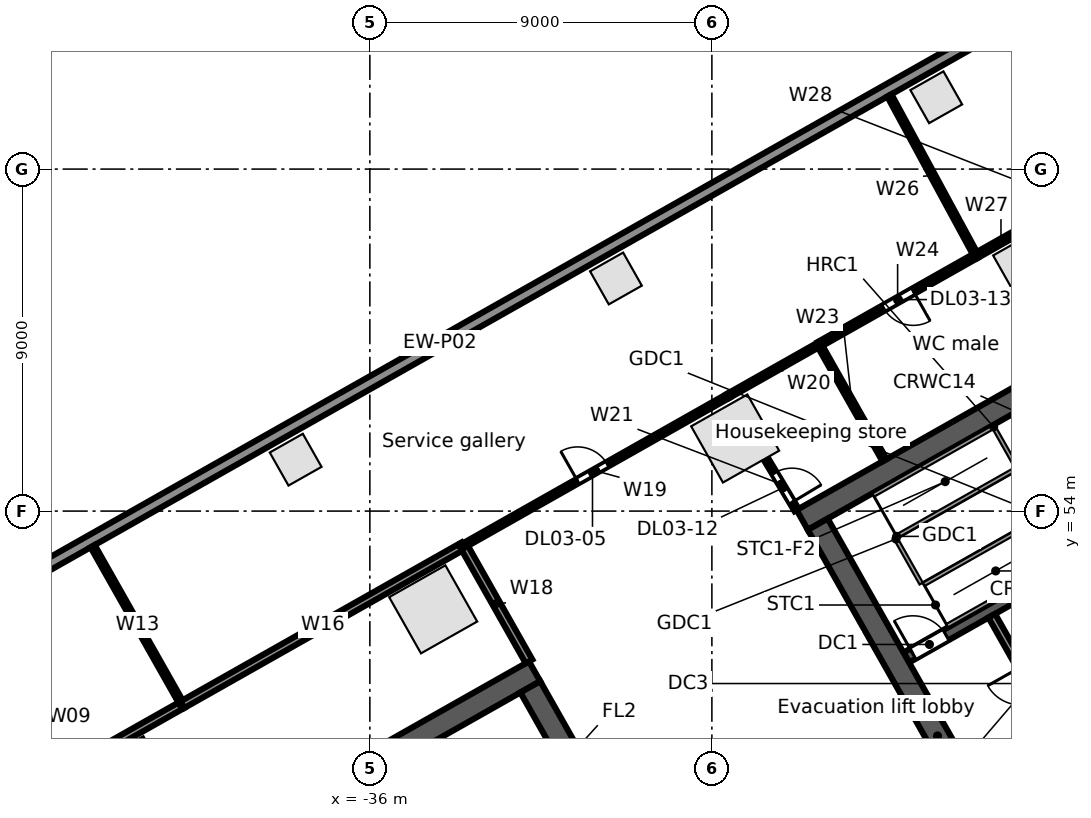
"""IFC4 building model, lengths in metres.
Left out: names, types, materials, properties, quantities, classifications, styles, units other than length and angle.
Written with IfcOpenShell. Run it as: python <this file> out.ifc"""

import sys

from ifc_helpers import new_model, si_unit, direction, frame, frame_2d, origin, origin_2d, place, context, subcontext, project, spatial, rectangle, extrude, element, fill, save


model = new_model("IFC4")
c1 = context("Model", 3, precision=1e-05, world=origin(), true_north=direction((0.0, 1.0)))
c2 = subcontext(c1, "Body", "Model", "MODEL_VIEW")
j1 = project(units=[si_unit("LENGTHUNIT", "METRE"), si_unit("PLANEANGLEUNIT", "RADIAN")], contexts=[c1])
p1 = place(None, origin())
s1 = spatial("IfcSite", under=j1, at=p1, CompositionType="ELEMENT")
p2 = place(p1, origin())
s2 = spatial("IfcBuilding", under=s1, at=p2, CompositionType="ELEMENT")
p3 = place(p2, frame((0.0, 0.0, 21.5)))
s3 = spatial("IfcBuildingStorey", under=s2, at=p3, CompositionType="ELEMENT", Elevation=21.5)
for number, where, z_axis, x_axis in (
    (1, (-18.441, 60.406, 0.0), (0.0, 0.0, 1.0), (-0.87, -0.492, 0.0)),
    (2, (-26.388, 55.91, 0.0), (0.0, 0.0, 1.0), (-0.87, -0.492, 0.0)),
    (3, (-34.334, 51.414, 0.0), (0.0, 0.0, 1.0), (-0.87, -0.492, 0.0)),
    (4, (-42.28, 46.919, 0.0), (0.0, 0.0, 1.0), (-0.87, -0.492, 0.0)),
):
    element("IfcColumn", number, at=place(p3, frame(where, z_axis=z_axis, x_axis=x_axis)), inside=s3, PredefinedType="COLUMN", context=c2, shape_type="SweptSolid", body=[
        extrude(rectangle(XDim=1.7, YDim=1.7, at=origin_2d()), origin(), (0.0, 0.0, 1.0), 5.0),
    ])
for number, where, z_axis, x_axis in (
    (5, (-21.096, 64.89, 0.0), (0.0, 0.0, 1.0), (-0.87, -0.492, 0.0)),
    (6, (-29.524, 60.122, 0.0), (0.0, 0.0, 1.0), (-0.87, -0.492, 0.0)),
    (7, (-37.953, 55.353, 0.0), (0.0, 0.0, 1.0), (-0.87, -0.492, 0.0)),
):
    element("IfcColumn", number, at=place(p3, frame(where, z_axis=z_axis, x_axis=x_axis)), inside=s3, PredefinedType="COLUMN", context=c2, shape_type="SweptSolid", body=[
        extrude(rectangle(XDim=1.0, YDim=1.0, at=origin_2d()), origin(), (0.0, 0.0, 1.0), 4.68),
    ])
p4 = place(p3, frame((-63.707, 41.701, 0.0), z_axis=(0.0, 0.0, 1.0), x_axis=(0.870355510268, 0.492423888277, 0.0)))
e8 = element("IfcWall", 8, at=p4, inside=s3, PredefinedType="STANDARD", context=c2, shape_type="SweptSolid", body=[
    extrude(rectangle(XDim=67.903, YDim=0.3, at=frame_2d((33.952, 0.0))), origin(), (0.0, 0.0, 1.0), 4.68),
])
p5 = place(p3, frame((-46.461, 41.412, 0.0), z_axis=(0.0, 0.0, 1.0), x_axis=(0.870350116061, 0.492433422375, 0.0)))
e9 = element("IfcWall", 9, at=p5, inside=s3, PredefinedType="SOLIDWALL", context=c2, shape_type="SweptSolid", body=[
    extrude(rectangle(XDim=17.0, YDim=0.6, at=frame_2d((8.5, 0.0))), origin(), (0.0, 0.0, 1.0), 4.68),
])
p6 = place(p3, frame((-31.778, 49.374, 0.0), z_axis=(0.0, 0.0, 1.0), x_axis=(0.492433046652, -0.870350328641, 0.0)))
e10 = element("IfcWall", 10, at=p6, inside=s3, PredefinedType="SOLIDWALL", context=c2, shape_type="SweptSolid", body=[
    extrude(rectangle(XDim=12.8, YDim=0.6, at=frame_2d((6.4, 0.0))), origin(), (0.0, 0.0, 1.0), 4.68),
])
p7 = place(p3, frame((-19.718, 46.316, 0.0), z_axis=(0.0, 0.0, 1.0), x_axis=(0.870353963862, 0.492426621528, 0.0)))
e11 = element("IfcWall", 11, at=p7, inside=s3, PredefinedType="SOLIDWALL", context=c2, shape_type="SweptSolid", body=[
    extrude(rectangle(XDim=4.9, YDim=0.3, at=frame_2d((2.45, 0.0))), origin(), (0.0, 0.0, 1.0), 4.68),
])
p8 = place(p7, frame((0.55, 0.0, 0.0)))
e12 = element("IfcOpeningElement", 12, at=p8, cuts=e11, PredefinedType="OPENING", context=c2, shape_type="SweptSolid", body=[
    extrude(rectangle(XDim=1.1, YDim=2.1, at=frame_2d((0.55, 1.05))), frame((0.0, 0.16, 0.0), z_axis=(0.0, -1.0, 0.0), x_axis=(1.0, 0.0, 0.0)), (0.0, 0.0, 1.0), 0.32),
])
p9 = place(p7, frame((2.85, 0.0, 0.0)))
e13 = element("IfcOpeningElement", 13, at=p9, cuts=e11, PredefinedType="OPENING", context=c2, shape_type="SweptSolid", body=[
    extrude(rectangle(XDim=0.9, YDim=2.1, at=frame_2d((0.45, 1.05))), frame((0.0, 0.16, 0.0), z_axis=(0.0, -1.0, 0.0), x_axis=(1.0, 0.0, 0.0)), (0.0, 0.0, 1.0), 0.32),
])
p10 = place(p3, frame((-21.885, 50.146, 0.0), z_axis=(0.0, 0.0, 1.0), x_axis=(0.870359411463, 0.492416992881, 0.0)))
e14 = element("IfcWall", 14, at=p10, inside=s3, PredefinedType="SOLIDWALL", context=c2, shape_type="SweptSolid", body=[
    extrude(rectangle(XDim=7.2, YDim=0.3, at=frame_2d((3.6, 0.0))), origin(), (0.0, 0.0, 1.0), 4.68),
])
p11 = place(p10, frame((0.2, 0.0, 0.0)))
e15 = element("IfcOpeningElement", 15, at=p11, cuts=e14, PredefinedType="OPENING", context=c2, shape_type="SweptSolid", body=[
    extrude(rectangle(XDim=1.0, YDim=2.1, at=frame_2d((0.5, 1.05))), frame((0.0, 0.16, 0.0), z_axis=(0.0, -1.0, 0.0), x_axis=(1.0, 0.0, 0.0)), (0.0, 0.0, 1.0), 0.32),
])
p12 = place(p3, frame((-24.623, 53.767, 0.0), z_axis=(0.0, 0.0, 1.0), x_axis=(0.870356627484, 0.492421913601, 0.0)))
e16 = element("IfcWall", 16, at=p12, inside=s3, PredefinedType="SOLIDWALL", context=c2, shape_type="SweptSolid", body=[
    extrude(rectangle(XDim=15.0, YDim=0.6, at=frame_2d((7.5, 0.0))), origin(), (0.0, 0.0, 1.0), 4.68),
])
p13 = place(p3, frame((-24.214, 53.654, 0.0), z_axis=(0.0, 0.0, 1.0), x_axis=(0.492441221355, -0.870345703448, 0.0)))
e17 = element("IfcWall", 17, at=p13, inside=s3, PredefinedType="SOLIDWALL", context=c2, shape_type="SweptSolid", body=[
    extrude(rectangle(XDim=12.8, YDim=0.6, at=frame_2d((6.4, 0.0))), origin(), (0.0, 0.0, 1.0), 4.68),
])
p14 = place(p3, frame((-19.635, 51.246, 0.0), z_axis=(0.0, 0.0, 1.0), x_axis=(0.492408451753, -0.87036424366, 0.0)))
e18 = element("IfcWall", 18, at=p14, inside=s3, PredefinedType="PARTITIONING", context=c2, shape_type="SweptSolid", body=[
    extrude(rectangle(XDim=4.1, YDim=0.2, at=frame_2d((2.05, 0.0))), origin(), (0.0, 0.0, 1.0), 4.68),
])
p15 = place(p14, frame((1.55, 0.0, 0.0)))
e19 = element("IfcOpeningElement", 19, at=p15, cuts=e18, PredefinedType="OPENING", context=c2, shape_type="SweptSolid", body=[
    extrude(rectangle(XDim=1.0, YDim=2.1, at=frame_2d((0.5, 1.05))), frame((0.0, 0.11, 0.0), z_axis=(0.0, -1.0, 0.0), x_axis=(1.0, 0.0, 0.0)), (0.0, 0.0, 1.0), 0.22),
])
p16 = place(p3, frame((-48.332, 44.719, 0.0), z_axis=(0.0, 0.0, 1.0), x_axis=(0.870331650579, 0.492466057713, 0.0)))
e20 = element("IfcWall", 20, at=p16, inside=s3, PredefinedType="PARTITIONING", context=c2, shape_type="SweptSolid", body=[
    extrude(rectangle(XDim=8.5, YDim=0.2, at=frame_2d((4.25, 0.0))), origin(), (0.0, 0.0, 1.0), 4.054),
])
p17 = place(p16, frame((3.45, 0.0, 0.0)))
e21 = element("IfcOpeningElement", 21, at=p17, cuts=e20, PredefinedType="OPENING", context=c2, shape_type="SweptSolid", body=[
    extrude(rectangle(XDim=1.8, YDim=2.1, at=frame_2d((0.9, 1.05))), frame((0.0, 0.11, 0.0), z_axis=(0.0, -1.0, 0.0), x_axis=(1.0, 0.0, 0.0)), (0.0, 0.0, 1.0), 0.22),
])
p18 = place(p3, frame((-43.295, 53.077, 0.0), z_axis=(0.0, 0.0, 1.0), x_axis=(0.492503605136, -0.87031040378, 0.0)))
e22 = element("IfcWall", 22, at=p18, inside=s3, PredefinedType="PARTITIONING", context=c2, shape_type="SweptSolid", body=[
    extrude(rectangle(XDim=4.793, YDim=0.125, at=frame_2d((2.397, 0.0))), origin(), (0.0, 0.0, 1.0), 3.96),
])
p19 = place(p3, frame((-40.934, 48.905, 0.0), z_axis=(0.0, 0.0, 1.0), x_axis=(0.870387854278, 0.492366716102, 0.0)))
e23 = element("IfcWall", 23, at=p19, inside=s3, PredefinedType="PARTITIONING", context=c2, shape_type="SweptSolid", body=[
    extrude(rectangle(XDim=8.5, YDim=0.2, at=frame_2d((4.25, 0.0))), origin(), (0.0, 0.0, 1.0), 4.054),
])
p20 = place(p3, frame((-33.536, 53.09, 0.0), z_axis=(0.0, 0.0, 1.0), x_axis=(0.492521469645, -0.870300294116, 0.0)))
e24 = element("IfcWall", 24, at=p20, inside=s3, PredefinedType="PARTITIONING", context=c2, shape_type="SweptSolid", body=[
    extrude(rectangle(XDim=3.5, YDim=0.2, at=frame_2d((1.75, 0.0))), origin(), (0.0, 0.0, 1.0), 3.96),
])
p21 = place(p3, frame((-33.536, 53.09, 0.0), z_axis=(0.0, 0.0, 1.0), x_axis=(0.870327439455, 0.492473499928, 0.0)))
e25 = element("IfcWall", 25, at=p21, inside=s3, PredefinedType="PARTITIONING", context=c2, shape_type="SweptSolid", body=[
    extrude(rectangle(XDim=8.0, YDim=0.125, at=frame_2d((4.0, 0.0))), origin(), (0.0, 0.0, 1.0), 3.742),
])
p22 = place(p21, frame((3.45, 0.0, 0.0)))
e26 = element("IfcOpeningElement", 26, at=p22, cuts=e25, PredefinedType="OPENING", context=c2, shape_type="SweptSolid", body=[
    extrude(rectangle(XDim=0.9, YDim=2.1, at=frame_2d((0.45, 1.05))), frame((0.0, 0.073, 0.0), z_axis=(0.0, -1.0, 0.0), x_axis=(1.0, 0.0, 0.0)), (0.0, 0.0, 1.0), 0.145),
])
p23 = place(p3, frame((-26.573, 57.03, 0.0), z_axis=(0.0, 0.0, 1.0), x_axis=(0.870344460795, 0.492443417626, 0.0)))
e27 = element("IfcWall", 27, at=p23, inside=s3, PredefinedType="PARTITIONING", context=c2, shape_type="SweptSolid", body=[
    extrude(rectangle(XDim=2.75, YDim=0.125, at=frame_2d((1.375, 0.0))), origin(), (0.0, 0.0, 1.0), 4.68),
])
p24 = place(p3, frame((-25.587, 55.387, 0.0), z_axis=(0.0, 0.0, 1.0), x_axis=(0.514767546849, -0.857329792268, 0.0)))
e28 = element("IfcWall", 28, at=p24, inside=s3, PredefinedType="PARTITIONING", context=c2, shape_type="SweptSolid", body=[
    extrude(rectangle(XDim=1.585, YDim=0.125, at=frame_2d((0.792, 0.0))), origin(), (0.0, 0.0, 1.0), 4.68),
])
p25 = place(p24, frame((0.45, 0.0, 0.0)))
e29 = element("IfcOpeningElement", 29, at=p25, cuts=e28, PredefinedType="OPENING", context=c2, shape_type="SweptSolid", body=[
    extrude(rectangle(XDim=0.9, YDim=2.1, at=frame_2d((0.45, 1.05))), frame((0.0, 0.073, 0.0), z_axis=(0.0, -1.0, 0.0), x_axis=(1.0, 0.0, 0.0)), (0.0, 0.0, 1.0), 0.145),
])
p26 = place(p3, frame((-24.18, 58.384, 0.0), z_axis=(0.0, 0.0, 1.0), x_axis=(0.492521469645, -0.870300294116, 0.0)))
e30 = element("IfcWall", 30, at=p26, inside=s3, PredefinedType="PARTITIONING", context=c2, shape_type="SweptSolid", body=[
    extrude(rectangle(XDim=3.5, YDim=0.125, at=frame_2d((1.75, 0.0))), origin(), (0.0, 0.0, 1.0), 3.96),
])
p27 = place(p3, frame((-24.18, 58.384, 0.0), z_axis=(0.0, 0.0, 1.0), x_axis=(0.870360772617, 0.492414587, 0.0)))
e31 = element("IfcWall", 31, at=p27, inside=s3, PredefinedType="PARTITIONING", context=c2, shape_type="SweptSolid", body=[
    extrude(rectangle(XDim=4.75, YDim=0.15, at=frame_2d((2.375, 0.0))), origin(), (0.0, 0.0, 1.0), 4.68),
])
p28 = place(p27, frame((1.95, 0.0, 0.0)))
e32 = element("IfcOpeningElement", 32, at=p28, cuts=e31, PredefinedType="OPENING", context=c2, shape_type="SweptSolid", body=[
    extrude(rectangle(XDim=0.9, YDim=2.1, at=frame_2d((0.45, 1.05))), frame((0.0, 0.085, 0.0), z_axis=(0.0, -1.0, 0.0), x_axis=(1.0, 0.0, 0.0)), (0.0, 0.0, 1.0), 0.17),
])
p29 = place(p3, frame((-22.33, 64.939, 0.0), z_axis=(0.0, 0.0, 1.0), x_axis=(0.476360236723, -0.879250206067, 0.0)))
e33 = element("IfcWall", 33, at=p29, inside=s3, PredefinedType="PARTITIONING", context=c2, shape_type="SweptSolid", body=[
    extrude(rectangle(XDim=4.795, YDim=0.125, at=frame_2d((2.397, 0.0))), origin(), (0.0, 0.0, 1.0), 3.96),
])
p30 = place(p3, frame((-20.046, 60.723, 0.0), z_axis=(0.0, 0.0, 1.0), x_axis=(0.870308175411, 0.492507542899, 0.0)))
e34 = element("IfcWall", 34, at=p30, inside=s3, PredefinedType="PARTITIONING", context=c2, shape_type="SweptSolid", body=[
    extrude(rectangle(XDim=1.5, YDim=0.15, at=frame_2d((0.75, 0.0))), origin(), (0.0, 0.0, 1.0), 3.952),
])
p31 = place(p11, origin())
e35 = element("IfcDoor", 35, at=p31, inside=s3, OperationType="SINGLE_SWING_LEFT", PredefinedType="DOOR", context=c2, shape_type="SweptSolid", body=[
    extrude(rectangle(XDim=1.0, YDim=2.1, at=frame_2d((0.5, 1.05))), frame((0.0, 0.025, 0.0), z_axis=(0.0, -1.0, 0.0), x_axis=(1.0, 0.0, 0.0)), (0.0, 0.0, 1.0), 0.05),
])
fill(e15, e35)
p32 = place(p22, origin())
e36 = element("IfcDoor", 36, at=p32, inside=s3, OperationType="SINGLE_SWING_LEFT", PredefinedType="DOOR", context=c2, shape_type="SweptSolid", body=[
    extrude(rectangle(XDim=0.9, YDim=2.1, at=frame_2d((0.45, 1.05))), frame((0.0, 0.025, 0.0), z_axis=(0.0, -1.0, 0.0), x_axis=(1.0, 0.0, 0.0)), (0.0, 0.0, 1.0), 0.05),
])
fill(e26, e36)
p33 = place(p25, origin())
e37 = element("IfcDoor", 37, at=p33, inside=s3, OperationType="SINGLE_SWING_RIGHT", PredefinedType="DOOR", context=c2, shape_type="SweptSolid", body=[
    extrude(rectangle(XDim=0.9, YDim=2.1, at=frame_2d((0.45, 1.05))), frame((0.0, 0.025, 0.0), z_axis=(0.0, -1.0, 0.0), x_axis=(1.0, 0.0, 0.0)), (0.0, 0.0, 1.0), 0.05),
])
fill(e29, e37)
p34 = place(p28, frame((0.9, 0.0, 0.0), z_axis=(0.0, 0.0, 1.0), x_axis=(-1.0, 0.0, 0.0)))
e38 = element("IfcDoor", 38, at=p34, inside=s3, OperationType="SINGLE_SWING_LEFT", PredefinedType="DOOR", context=c2, shape_type="SweptSolid", body=[
    extrude(rectangle(XDim=0.9, YDim=2.1, at=frame_2d((0.45, 1.05))), frame((0.0, 0.025, 0.0), z_axis=(0.0, -1.0, 0.0), x_axis=(1.0, 0.0, 0.0)), (0.0, 0.0, 1.0), 0.05),
])
fill(e32, e38)
save(model, sys.argv[1])
